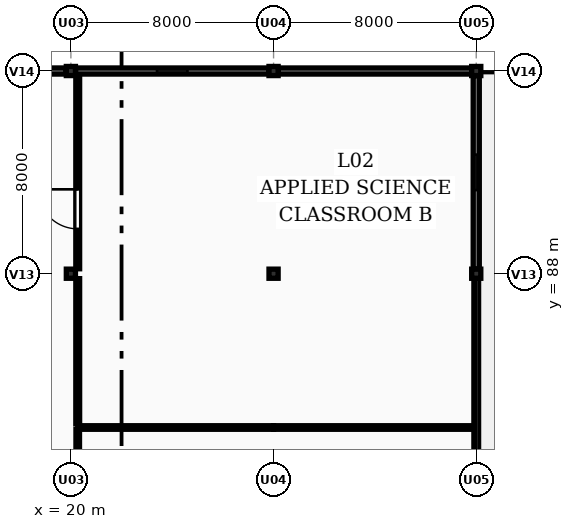
"""IFC4 building model, lengths in metres.
Left out: names, types, materials, properties, quantities, classifications, styles, units other than length and angle.
Written with IfcOpenShell. Run it as: python <this file> out.ifc"""

import sys

from ifc_helpers import new_model, si_unit, direction, frame, frame_2d, origin, origin_2d, place, context, subcontext, project, spatial, rectangle, extrude, element, fill, save


model = new_model("IFC4")
c1 = context("Model", 3, precision=1e-05, world=origin(), true_north=direction((0.0, 1.0)))
c2 = subcontext(c1, "Body", "Model", "MODEL_VIEW")
j1 = project(units=[si_unit("LENGTHUNIT", "METRE"), si_unit("PLANEANGLEUNIT", "RADIAN")], contexts=[c1])
p1 = place(None, origin())
s1 = spatial("IfcSite", under=j1, at=p1, CompositionType="ELEMENT")
p2 = place(p1, origin())
s2 = spatial("IfcBuilding", under=s1, at=p2, CompositionType="ELEMENT")
p3 = place(p2, frame((0.0, 0.0, 8.4)))
s3 = spatial("IfcBuildingStorey", under=s2, at=p3, CompositionType="ELEMENT", Elevation=8.4)
for number, where, z_axis, x_axis in (
    (1, (20.0, 88.0, 0.0), (0.0, 0.0, 1.0), (1.0, 0.0, 0.0)),
    (2, (20.0, 96.0, 0.0), (0.0, 0.0, 1.0), (1.0, 0.0, 0.0)),
    (3, (28.0, 88.0, 0.0), (0.0, 0.0, 1.0), (1.0, 0.0, 0.0)),
    (4, (28.0, 96.0, 0.0), (0.0, 0.0, 1.0), (1.0, 0.0, 0.0)),
    (5, (36.0, 88.0, 0.0), (0.0, 0.0, 1.0), (1.0, 0.0, 0.0)),
    (6, (36.0, 96.0, 0.0), (0.0, 0.0, 1.0), (1.0, 0.0, 0.0)),
):
    element("IfcColumn", number, at=place(p3, frame(where, z_axis=z_axis, x_axis=x_axis)), inside=s3, PredefinedType="COLUMN", context=c2, shape_type="SweptSolid", body=[
        extrude(rectangle(XDim=0.36, YDim=0.36, at=origin_2d()), origin(), (0.0, 0.0, 1.0), 3.9),
    ])
p4 = place(p3, frame((12.18, 96.0, 0.0), z_axis=(0.0, 0.0, 1.0), x_axis=(1.0, 0.0, 0.0)))
e7 = element("IfcWall", 7, at=p4, inside=s3, PredefinedType="SOLIDWALL", context=c2, shape_type="SweptSolid", body=[
    extrude(rectangle(XDim=7.64, YDim=0.24, at=frame_2d((3.82, 0.0))), origin(), (0.0, 0.0, 1.0), 3.09),
])
p5 = place(p4, frame((1.72, 0.0, 0.95)))
e8 = element("IfcOpeningElement", 8, at=p5, cuts=e7, PredefinedType="OPENING", context=c2, shape_type="SweptSolid", body=[
    extrude(rectangle(XDim=2.4, YDim=1.5, at=frame_2d((1.2, 0.75))), frame((0.0, 0.13, 0.0), z_axis=(0.0, -1.0, 0.0), x_axis=(1.0, 0.0, 0.0)), (0.0, 0.0, 1.0), 0.26),
])
p6 = place(p3, frame((20.18, 96.0, 0.0), z_axis=(0.0, 0.0, 1.0), x_axis=(1.0, 0.0, 0.0)))
e9 = element("IfcWall", 9, at=p6, inside=s3, PredefinedType="SOLIDWALL", context=c2, shape_type="SweptSolid", body=[
    extrude(rectangle(XDim=7.64, YDim=0.24, at=frame_2d((3.82, 0.0))), origin(), (0.0, 0.0, 1.0), 3.09),
])
p7 = place(p6, frame((3.22, 0.0, 0.95)))
e10 = element("IfcOpeningElement", 10, at=p7, cuts=e9, PredefinedType="OPENING", context=c2, shape_type="SweptSolid", body=[
    extrude(rectangle(XDim=1.2, YDim=1.65, at=frame_2d((0.6, 0.825))), frame((0.0, 0.13, 0.0), z_axis=(0.0, -1.0, 0.0), x_axis=(1.0, 0.0, 0.0)), (0.0, 0.0, 1.0), 0.26),
])
p8 = place(p3, frame((28.18, 96.0, 0.0), z_axis=(0.0, 0.0, 1.0), x_axis=(1.0, 0.0, 0.0)))
e11 = element("IfcWall", 11, at=p8, inside=s3, PredefinedType="SOLIDWALL", context=c2, shape_type="SweptSolid", body=[
    extrude(rectangle(XDim=7.64, YDim=0.24, at=frame_2d((3.82, 0.0))), origin(), (0.0, 0.0, 1.0), 3.09),
])
p9 = place(p3, frame((36.0, 95.82, 0.0), z_axis=(0.0, 0.0, 1.0), x_axis=(0.0, -1.0, 0.0)))
e12 = element("IfcWall", 12, at=p9, inside=s3, PredefinedType="SOLIDWALL", context=c2, shape_type="SweptSolid", body=[
    extrude(rectangle(XDim=7.64, YDim=0.24, at=frame_2d((3.82, 0.0))), origin(), (0.0, 0.0, 1.0), 3.09),
])
p10 = place(p9, frame((3.12, 0.0, 0.95)))
e13 = element("IfcOpeningElement", 13, at=p10, cuts=e12, PredefinedType="OPENING", context=c2, shape_type="SweptSolid", body=[
    extrude(rectangle(XDim=1.4, YDim=1.65, at=frame_2d((0.7, 0.825))), frame((0.0, 0.13, 0.0), z_axis=(0.0, -1.0, 0.0), x_axis=(1.0, 0.0, 0.0)), (0.0, 0.0, 1.0), 0.26),
])
p11 = place(p3, frame((36.0, 87.82, 0.0), z_axis=(0.0, 0.0, 1.0), x_axis=(0.0, -1.0, 0.0)))
e14 = element("IfcWall", 14, at=p11, inside=s3, PredefinedType="SOLIDWALL", context=c2, shape_type="SweptSolid", body=[
    extrude(rectangle(XDim=7.64, YDim=0.185, at=frame_2d((3.82, 0.0))), origin(), (0.0, 0.0, 1.0), 0.95),
])
p12 = place(p3, frame((20.27, 81.93, 0.0), z_axis=(0.0, 0.0, 1.0), x_axis=(1.0, 0.0, 0.0)))
e15 = element("IfcWall", 15, at=p12, inside=s3, PredefinedType="PARTITIONING", context=c2, shape_type="SweptSolid", body=[
    extrude(rectangle(XDim=7.73, YDim=0.14, at=frame_2d((3.865, 0.0))), origin(), (0.0, 0.0, 1.0), 3.65),
])
p13 = place(p3, frame((28.0, 81.93, 0.0), z_axis=(0.0, 0.0, 1.0), x_axis=(1.0, 0.0, 0.0)))
e16 = element("IfcWall", 16, at=p13, inside=s3, PredefinedType="PARTITIONING", context=c2, shape_type="SweptSolid", body=[
    extrude(rectangle(XDim=7.865, YDim=0.14, at=frame_2d((3.933, 0.0))), origin(), (0.0, 0.0, 1.0), 3.65),
])
p14 = place(p3, frame((20.27, 80.195, 0.0), z_axis=(0.0, 0.0, 1.0), x_axis=(0.0, 1.0, 0.0)))
e17 = element("IfcWall", 17, at=p14, inside=s3, PredefinedType="PARTITIONING", context=c2, shape_type="SweptSolid", body=[
    extrude(rectangle(XDim=1.65, YDim=0.14, at=frame_2d((0.825, 0.0))), origin(), (0.0, 0.0, 1.0), 3.09),
])
p15 = place(p3, frame((20.27, 82.07, 0.0), z_axis=(0.0, 0.0, 1.0), x_axis=(0.0, 1.0, 0.0)))
e18 = element("IfcWall", 18, at=p15, inside=s3, PredefinedType="PARTITIONING", context=c2, shape_type="SweptSolid", body=[
    extrude(rectangle(XDim=5.735, YDim=0.15, at=frame_2d((2.867, 0.0))), origin(), (0.0, 0.0, 1.0), 3.09),
])
p16 = place(p3, frame((20.27, 88.195, 0.0), z_axis=(0.0, 0.0, 1.0), x_axis=(0.0, 1.0, 0.0)))
e19 = element("IfcWall", 19, at=p16, inside=s3, PredefinedType="PARTITIONING", context=c2, shape_type="SweptSolid", body=[
    extrude(rectangle(XDim=7.643, YDim=0.15, at=frame_2d((3.821, 0.0))), origin(), (0.0, 0.0, 1.0), 3.09),
])
p17 = place(p16, frame((1.575, 0.0, 0.0)))
e20 = element("IfcOpeningElement", 20, at=p17, cuts=e19, PredefinedType="OPENING", context=c2, shape_type="SweptSolid", body=[
    extrude(rectangle(XDim=1.56, YDim=2.25, at=frame_2d((0.78, 1.125))), frame((0.0, 0.085, 0.0), z_axis=(0.0, -1.0, 0.0), x_axis=(1.0, 0.0, 0.0)), (0.0, 0.0, 1.0), 0.17),
])
p18 = place(p7, origin())
e21 = element("IfcWindow", 21, at=p18, inside=s3, PartitioningType="SINGLE_PANEL", PredefinedType="WINDOW", context=c2, shape_type="SweptSolid", body=[
    extrude(rectangle(XDim=1.2, YDim=1.65, at=frame_2d((0.6, 0.825))), frame((0.0, 0.03, 0.0), z_axis=(0.0, -1.0, 0.0), x_axis=(1.0, 0.0, 0.0)), (0.0, 0.0, 1.0), 0.06),
])
fill(e10, e21)
p19 = place(p10, origin())
e22 = element("IfcWindow", 22, at=p19, inside=s3, PartitioningType="SINGLE_PANEL", PredefinedType="WINDOW", context=c2, shape_type="SweptSolid", body=[
    extrude(rectangle(XDim=1.4, YDim=1.65, at=frame_2d((0.7, 0.825))), frame((0.0, 0.03, 0.0), z_axis=(0.0, -1.0, 0.0), x_axis=(1.0, 0.0, 0.0)), (0.0, 0.0, 1.0), 0.06),
])
fill(e13, e22)
p20 = place(p17, origin())
e23 = element("IfcDoor", 23, at=p20, inside=s3, OperationType="SINGLE_SWING_RIGHT", PredefinedType="DOOR", context=c2, shape_type="SweptSolid", body=[
    extrude(rectangle(XDim=1.56, YDim=2.25, at=frame_2d((0.78, 1.125))), frame((0.0, 0.025, 0.0), z_axis=(0.0, -1.0, 0.0), x_axis=(1.0, 0.0, 0.0)), (0.0, 0.0, 1.0), 0.05),
])
fill(e20, e23)
save(model, sys.argv[1])
